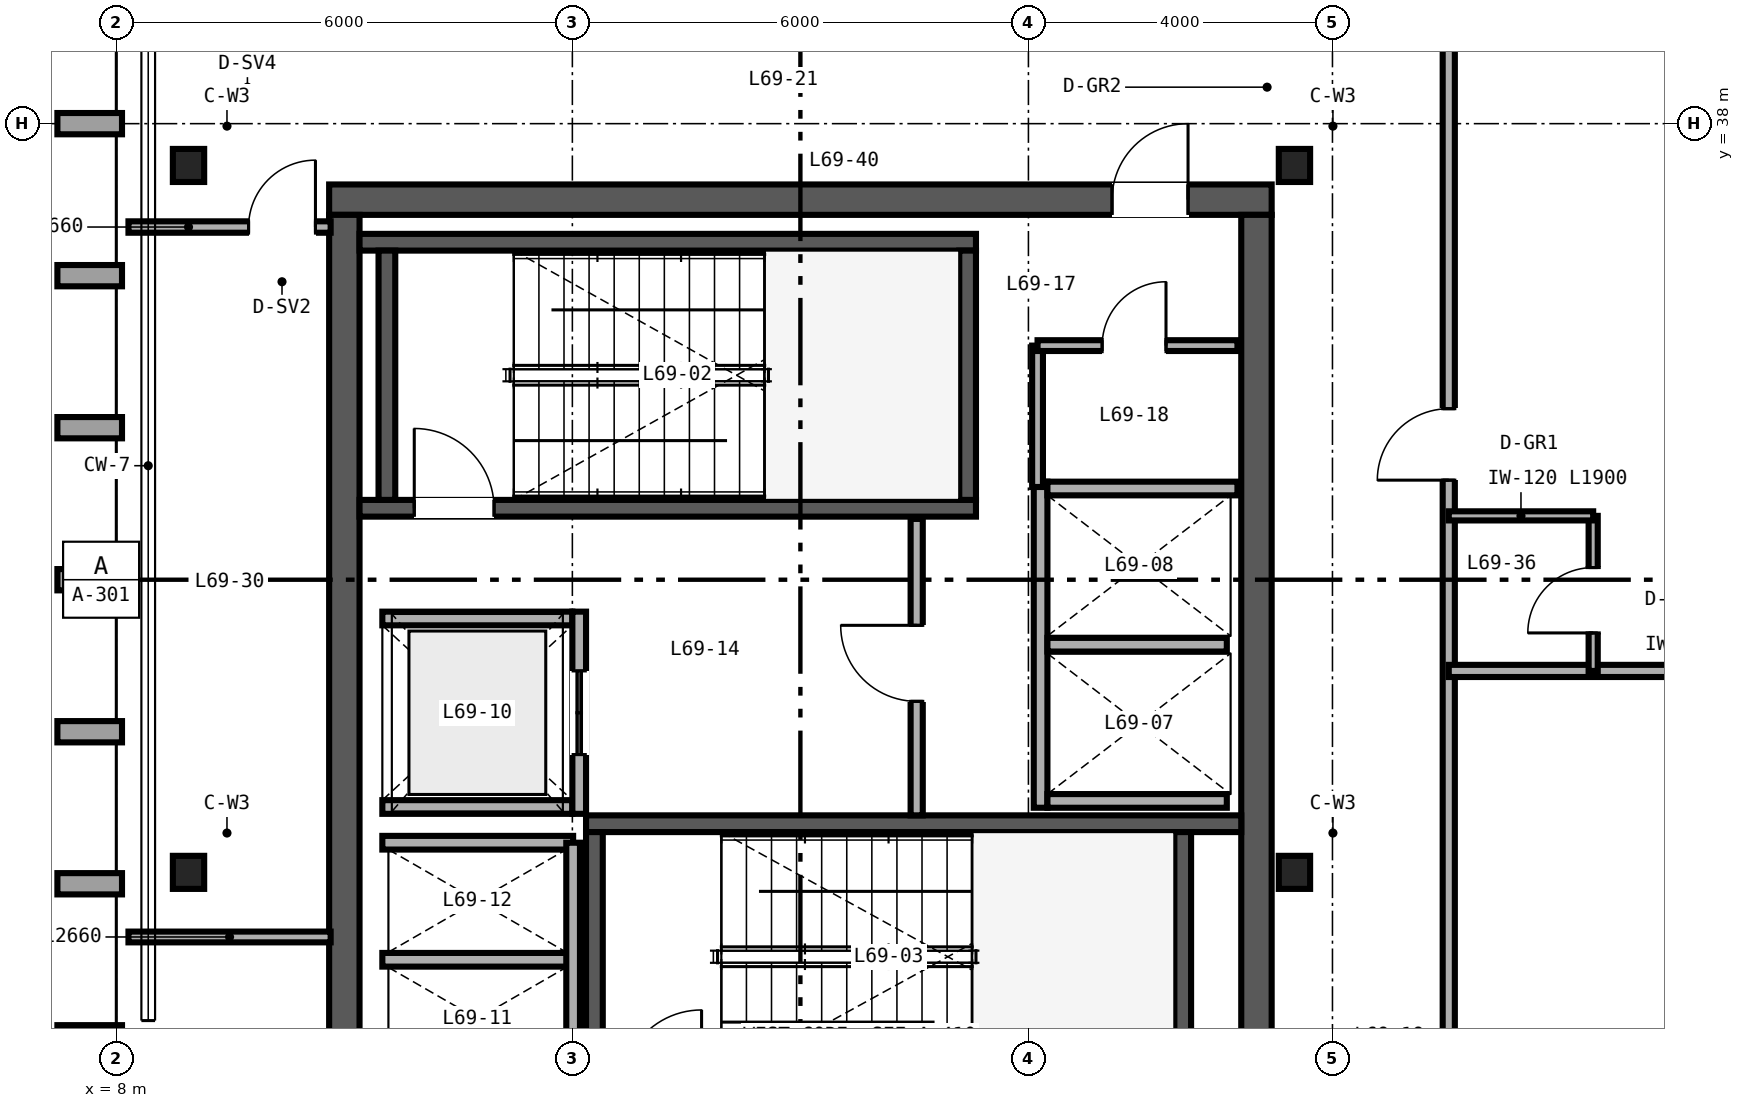
"""IFC4 building model, lengths in metres.
Left out: names, types, materials, properties, quantities, classifications, styles, units other than length and angle.
Written with IfcOpenShell. Run it as: python <this file> out.ifc"""

import sys

from ifc_helpers import new_model, si_unit, direction, frame, frame_2d, origin, origin_2d, place, context, subcontext, project, spatial, rectangle, i_section, extrude, source, transform, mapped, element, fill, save


model = new_model("IFC4")
c1 = context("Model", 3, precision=1e-05, world=origin(), true_north=direction((0.0, 1.0)))
c2 = subcontext(c1, "Body", "Model", "MODEL_VIEW")
j1 = project(units=[si_unit("LENGTHUNIT", "METRE"), si_unit("PLANEANGLEUNIT", "RADIAN")], contexts=[c1])
p1 = place(None, origin())
s1 = spatial("IfcSite", under=j1, at=p1, CompositionType="ELEMENT")
p2 = place(p1, origin())
s2 = spatial("IfcBuilding", under=s1, at=p2, CompositionType="ELEMENT")
p3 = place(p2, frame((0.0, 0.0, 272.4)))
s3 = spatial("IfcBuildingStorey", under=s2, at=p3, CompositionType="ELEMENT", Elevation=272.4)
p4 = place(p3, frame((10.8, 37.0, 0.0), z_axis=(0.0, 0.0, 1.0), x_axis=(1.0, 0.0, 0.0)))
e1 = element("IfcWall", 1, at=p4, inside=s3, PredefinedType="SHEAR", context=c2, shape_type="SweptSolid", body=[
    extrude(rectangle(XDim=12.4, YDim=0.4, at=frame_2d((6.2, 0.0))), origin(), (0.0, 0.0, 1.0), 3.38),
])
p5 = place(p4, frame((10.3, 0.0, 0.0)))
e2 = element("IfcOpeningElement", 2, at=p5, cuts=e1, PredefinedType="OPENING", context=c2, shape_type="SweptSolid", body=[
    extrude(rectangle(XDim=1.0, YDim=2.15, at=frame_2d((0.5, 1.075))), frame((0.0, 0.21, 0.0), z_axis=(0.0, -1.0, 0.0), x_axis=(1.0, 0.0, 0.0)), (0.0, 0.0, 1.0), 0.42),
])
for number, where, z_axis, x_axis in (
    (3, (11.0, 15.2, 0.0), (0.0, 0.0, 1.0), (0.0, 1.0, 0.0)),
    (4, (23.0, 15.2, 0.0), (0.0, 0.0, 1.0), (0.0, 1.0, 0.0)),
):
    element("IfcWall", number, at=place(p3, frame(where, z_axis=z_axis, x_axis=x_axis)), inside=s3, PredefinedType="SHEAR", context=c2, shape_type="SweptSolid", body=[
        extrude(rectangle(XDim=21.6, YDim=0.4, at=frame_2d((10.8, 0.0))), origin(), (0.0, 0.0, 1.0), 3.38),
    ])
p6 = place(p3, frame((11.2, 32.94, 0.0), z_axis=(0.0, 0.0, 1.0), x_axis=(1.0, 0.0, 0.0)))
e5 = element("IfcWall", 5, at=p6, inside=s3, PredefinedType="SHEAR", context=c2, shape_type="SweptSolid", body=[
    extrude(rectangle(XDim=8.11, YDim=0.22, at=frame_2d((4.055, 0.0))), origin(), (0.0, 0.0, 1.0), 3.4),
])
p7 = place(p6, frame((0.72, 0.0, 0.0)))
e6 = element("IfcOpeningElement", 6, at=p7, cuts=e5, PredefinedType="OPENING", context=c2, shape_type="SweptSolid", body=[
    extrude(rectangle(XDim=1.05, YDim=2.15, at=frame_2d((0.525, 1.075))), frame((0.0, 0.12, 0.0), z_axis=(0.0, -1.0, 0.0), x_axis=(1.0, 0.0, 0.0)), (0.0, 0.0, 1.0), 0.24),
])
p8 = place(p3, frame((11.2, 36.44, 0.0), z_axis=(0.0, 0.0, 1.0), x_axis=(1.0, 0.0, 0.0)))
e7 = element("IfcWall", 7, at=p8, inside=s3, PredefinedType="SHEAR", context=c2, shape_type="SweptSolid", body=[
    extrude(rectangle(XDim=8.11, YDim=0.22, at=frame_2d((4.055, 0.0))), origin(), (0.0, 0.0, 1.0), 3.4),
])
for number, where, z_axis, x_axis in (
    (8, (11.56, 33.05, 0.0), (0.0, 0.0, 1.0), (0.0, 1.0, 0.0)),
    (9, (19.2, 33.05, 0.0), (0.0, 0.0, 1.0), (0.0, 1.0, 0.0)),
):
    element("IfcWall", number, at=place(p3, frame(where, z_axis=z_axis, x_axis=x_axis)), inside=s3, PredefinedType="SHEAR", context=c2, shape_type="SweptSolid", body=[
        extrude(rectangle(XDim=3.28, YDim=0.22, at=frame_2d((1.64, 0.0))), origin(), (0.0, 0.0, 1.0), 3.4),
    ])
p9 = place(p3, frame((14.18, 28.79, 0.0), z_axis=(0.0, 0.0, 1.0), x_axis=(1.0, 0.0, 0.0)))
e10 = element("IfcWall", 10, at=p9, inside=s3, PredefinedType="SHEAR", context=c2, shape_type="SweptSolid", body=[
    extrude(rectangle(XDim=8.62, YDim=0.22, at=frame_2d((4.31, 0.0))), origin(), (0.0, 0.0, 1.0), 3.4),
])
for number, where, z_axis, x_axis in (
    (11, (14.29, 25.4, 0.0), (0.0, 0.0, 1.0), (0.0, 1.0, 0.0)),
    (12, (22.03, 25.4, 0.0), (0.0, 0.0, 1.0), (0.0, 1.0, 0.0)),
):
    element("IfcWall", number, at=place(p3, frame(where, z_axis=z_axis, x_axis=x_axis)), inside=s3, PredefinedType="SHEAR", context=c2, shape_type="SweptSolid", body=[
        extrude(rectangle(XDim=3.28, YDim=0.22, at=frame_2d((1.64, 0.0))), origin(), (0.0, 0.0, 1.0), 3.4),
    ])
m1 = source(origin(), c2, "Body", "SweptSolid", [
    extrude(i_section(OverallWidth=0.412, OverallDepth=0.435, WebThickness=0.036, FlangeThickness=0.057, FilletRadius=0.025, at=origin_2d()), origin(), (0.0, 0.0, 1.0), 3.38),
])
for number, where, z_axis, x_axis in (
    (13, (8.95, 28.15, 0.0), (0.0, 0.0, 1.0), (1.0, 0.0, 0.0)),
    (14, (23.5, 28.15, 0.0), (0.0, 0.0, 1.0), (1.0, 0.0, 0.0)),
    (15, (8.95, 37.45, 0.0), (0.0, 0.0, 1.0), (1.0, 0.0, 0.0)),
    (16, (23.5, 37.45, 0.0), (0.0, 0.0, 1.0), (1.0, 0.0, 0.0)),
):
    element("IfcColumn", number, at=place(p3, frame(where, z_axis=z_axis, x_axis=x_axis)), inside=s3, PredefinedType="COLUMN", context=c2, shape_type="MappedRepresentation", body=[
        mapped(m1, transform((0.0, 0.0, 0.0), scale=1.0)),
    ])
p10 = place(p3, frame((20.16, 29.0, 0.0), z_axis=(0.0, 0.0, 1.0), x_axis=(0.0, 1.0, 0.0)))
e17 = element("IfcWall", 17, at=p10, inside=s3, PredefinedType="SOLIDWALL", context=c2, shape_type="SweptSolid", body=[
    extrude(rectangle(XDim=4.29, YDim=0.18, at=frame_2d((2.145, 0.0))), origin(), (0.0, 0.0, 1.0), 3.38),
])
p11 = place(p3, frame((20.25, 29.09, 0.0), z_axis=(0.0, 0.0, 1.0), x_axis=(1.0, 0.0, 0.0)))
e18 = element("IfcWall", 18, at=p11, inside=s3, PredefinedType="SOLIDWALL", context=c2, shape_type="SweptSolid", body=[
    extrude(rectangle(XDim=2.36, YDim=0.18, at=frame_2d((1.18, 0.0))), origin(), (0.0, 0.0, 1.0), 3.38),
])
p12 = place(p3, frame((20.25, 33.2, 0.0), z_axis=(0.0, 0.0, 1.0), x_axis=(1.0, 0.0, 0.0)))
e19 = element("IfcWall", 19, at=p12, inside=s3, PredefinedType="SOLIDWALL", context=c2, shape_type="SweptSolid", body=[
    extrude(rectangle(XDim=2.5, YDim=0.18, at=frame_2d((1.25, 0.0))), origin(), (0.0, 0.0, 1.0), 3.38),
])
p13 = place(p3, frame((20.25, 31.145, 0.0), z_axis=(0.0, 0.0, 1.0), x_axis=(1.0, 0.0, 0.0)))
e20 = element("IfcWall", 20, at=p13, inside=s3, PredefinedType="SOLIDWALL", context=c2, shape_type="SweptSolid", body=[
    extrude(rectangle(XDim=2.36, YDim=0.18, at=frame_2d((1.18, 0.0))), origin(), (0.0, 0.0, 1.0), 3.38),
])
for number, where, z_axis, x_axis in (
    (21, (11.5, 29.01, 0.0), (0.0, 0.0, 1.0), (1.0, 0.0, 0.0)),
    (22, (11.5, 31.49, 0.0), (0.0, 0.0, 1.0), (1.0, 0.0, 0.0)),
):
    element("IfcWall", number, at=place(p3, frame(where, z_axis=z_axis, x_axis=x_axis)), inside=s3, PredefinedType="SOLIDWALL", context=c2, shape_type="SweptSolid", body=[
        extrude(rectangle(XDim=2.5, YDim=0.18, at=frame_2d((1.25, 0.0))), origin(), (0.0, 0.0, 1.0), 3.38),
    ])
p14 = place(p3, frame((14.09, 28.92, 0.0), z_axis=(0.0, 0.0, 1.0), x_axis=(0.0, 1.0, 0.0)))
e23 = element("IfcWall", 23, at=p14, inside=s3, PredefinedType="SOLIDWALL", context=c2, shape_type="SweptSolid", body=[
    extrude(rectangle(XDim=2.66, YDim=0.18, at=frame_2d((1.33, 0.0))), origin(), (0.0, 0.0, 1.0), 3.38),
])
p15 = place(p14, frame((0.78, 0.0, 0.0)))
e24 = element("IfcOpeningElement", 24, at=p15, cuts=e23, PredefinedType="OPENING", context=c2, shape_type="SweptSolid", body=[
    extrude(rectangle(XDim=1.1, YDim=2.2, at=frame_2d((0.55, 1.1))), frame((0.0, 0.1, 0.0), z_axis=(0.0, -1.0, 0.0), x_axis=(1.0, 0.0, 0.0)), (0.0, 0.0, 1.0), 0.2),
])
for number, where, z_axis, x_axis in (
    (25, (11.5, 27.0, 0.0), (0.0, 0.0, 1.0), (1.0, 0.0, 0.0)),
    (26, (11.5, 28.54, 0.0), (0.0, 0.0, 1.0), (1.0, 0.0, 0.0)),
):
    element("IfcWall", number, at=place(p3, frame(where, z_axis=z_axis, x_axis=x_axis)), inside=s3, PredefinedType="SOLIDWALL", context=c2, shape_type="SweptSolid", body=[
        extrude(rectangle(XDim=2.51, YDim=0.18, at=frame_2d((1.255, 0.0))), origin(), (0.0, 0.0, 1.0), 3.38),
    ])
p16 = place(p3, frame((14.01, 25.46, 0.0), z_axis=(0.0, 0.0, 1.0), x_axis=(0.0, 1.0, 0.0)))
e27 = element("IfcWall", 27, at=p16, inside=s3, PredefinedType="SOLIDWALL", context=c2, shape_type="SweptSolid", body=[
    extrude(rectangle(XDim=3.08, YDim=0.18, at=frame_2d((1.54, 0.0))), origin(), (0.0, 0.0, 1.0), 3.38),
])
p17 = place(p3, frame((18.53, 28.9, 0.0), z_axis=(0.0, 0.0, 1.0), x_axis=(0.0, 1.0, 0.0)))
e28 = element("IfcWall", 28, at=p17, inside=s3, PredefinedType="PARTITIONING", context=c2, shape_type="SweptSolid", body=[
    extrude(rectangle(XDim=3.9, YDim=0.16, at=frame_2d((1.95, 0.0))), origin(), (0.0, 0.0, 1.0), 3.38),
])
p18 = place(p17, frame((1.5, 0.0, 0.0)))
e29 = element("IfcOpeningElement", 29, at=p18, cuts=e28, PredefinedType="OPENING", context=c2, shape_type="SweptSolid", body=[
    extrude(rectangle(XDim=1.0, YDim=2.15, at=frame_2d((0.5, 1.075))), frame((0.0, 0.09, 0.0), z_axis=(0.0, -1.0, 0.0), x_axis=(1.0, 0.0, 0.0)), (0.0, 0.0, 1.0), 0.18),
])
p19 = place(p3, frame((20.12, 33.22, 0.0), z_axis=(0.0, 0.0, 1.0), x_axis=(0.0, 1.0, 0.0)))
e30 = element("IfcWall", 30, at=p19, inside=s3, PredefinedType="PARTITIONING", context=c2, shape_type="SweptSolid", body=[
    extrude(rectangle(XDim=1.86, YDim=0.142, at=frame_2d((0.93, 0.0))), origin(), (0.0, 0.0, 1.0), 3.38),
])
p20 = place(p3, frame((20.12, 35.08, 0.0), z_axis=(0.0, 0.0, 1.0), x_axis=(1.0, 0.0, 0.0)))
e31 = element("IfcWall", 31, at=p20, inside=s3, PredefinedType="PARTITIONING", context=c2, shape_type="SweptSolid", body=[
    extrude(rectangle(XDim=2.63, YDim=0.142, at=frame_2d((1.315, 0.0))), origin(), (0.0, 0.0, 1.0), 3.38),
])
p21 = place(p20, frame((0.85, 0.0, 0.0)))
e32 = element("IfcOpeningElement", 32, at=p21, cuts=e31, PredefinedType="OPENING", context=c2, shape_type="SweptSolid", body=[
    extrude(rectangle(XDim=0.84, YDim=2.1, at=frame_2d((0.42, 1.05))), frame((0.0, 0.081, 0.0), z_axis=(0.0, -1.0, 0.0), x_axis=(1.0, 0.0, 0.0)), (0.0, 0.0, 1.0), 0.162),
])
p22 = place(p3, frame((8.16, 36.64, 0.0), z_axis=(0.0, 0.0, 1.0), x_axis=(1.0, 0.0, 0.0)))
e33 = element("IfcWall", 33, at=p22, inside=s3, PredefinedType="PARTITIONING", context=c2, shape_type="SweptSolid", body=[
    extrude(rectangle(XDim=2.66, YDim=0.15, at=frame_2d((1.33, 0.0))), origin(), (0.0, 0.0, 1.0), 2.763),
])
p23 = place(p22, frame((1.58, 0.0, 0.0)))
e34 = element("IfcOpeningElement", 34, at=p23, cuts=e33, PredefinedType="OPENING", context=c2, shape_type="SweptSolid", body=[
    extrude(rectangle(XDim=0.88, YDim=2.15, at=frame_2d((0.44, 1.075))), frame((0.0, 0.085, 0.0), z_axis=(0.0, -1.0, 0.0), x_axis=(1.0, 0.0, 0.0)), (0.0, 0.0, 1.0), 0.17),
])
p24 = place(p3, frame((8.16, 27.3, 0.0), z_axis=(0.0, 0.0, 1.0), x_axis=(1.0, 0.0, 0.0)))
e35 = element("IfcWall", 35, at=p24, inside=s3, PredefinedType="PARTITIONING", context=c2, shape_type="SweptSolid", body=[
    extrude(rectangle(XDim=2.66, YDim=0.142, at=frame_2d((1.33, 0.0))), origin(), (0.0, 0.0, 1.0), 2.601),
])
p25 = place(p3, frame((25.53, 11.15, 0.0), z_axis=(0.0, 0.0, 1.0), x_axis=(0.0, 1.0, 0.0)))
e36 = element("IfcWall", 36, at=p25, inside=s3, PredefinedType="PARTITIONING", context=c2, shape_type="SweptSolid", body=[
    extrude(rectangle(XDim=29.7, YDim=0.16, at=frame_2d((14.85, 0.0))), origin(), (0.0, 0.0, 1.0), 2.524),
])
p26 = place(p25, frame((2.51, 0.0, 0.0)))
e37 = element("IfcOpeningElement", 37, at=p26, cuts=e36, PredefinedType="OPENING", context=c2, shape_type="SweptSolid", body=[
    extrude(rectangle(XDim=0.94, YDim=2.15, at=frame_2d((0.47, 1.075))), frame((0.0, 0.09, 0.0), z_axis=(0.0, -1.0, 0.0), x_axis=(1.0, 0.0, 0.0)), (0.0, 0.0, 1.0), 0.18),
])
p27 = place(p25, frame((12.56, 0.0, 0.0)))
e38 = element("IfcOpeningElement", 38, at=p27, cuts=e36, PredefinedType="OPENING", context=c2, shape_type="SweptSolid", body=[
    extrude(rectangle(XDim=0.94, YDim=2.15, at=frame_2d((0.47, 1.075))), frame((0.0, 0.09, 0.0), z_axis=(0.0, -1.0, 0.0), x_axis=(1.0, 0.0, 0.0)), (0.0, 0.0, 1.0), 0.18),
])
p28 = place(p25, frame((22.16, 0.0, 0.0)))
e39 = element("IfcOpeningElement", 39, at=p28, cuts=e36, PredefinedType="OPENING", context=c2, shape_type="SweptSolid", body=[
    extrude(rectangle(XDim=0.94, YDim=2.15, at=frame_2d((0.47, 1.075))), frame((0.0, 0.09, 0.0), z_axis=(0.0, -1.0, 0.0), x_axis=(1.0, 0.0, 0.0)), (0.0, 0.0, 1.0), 0.18),
])
p29 = place(p3, frame((25.53, 30.8, 0.0), z_axis=(0.0, 0.0, 1.0), x_axis=(1.0, 0.0, 0.0)))
e40 = element("IfcWall", 40, at=p29, inside=s3, PredefinedType="PARTITIONING", context=c2, shape_type="SweptSolid", body=[
    extrude(rectangle(XDim=7.15, YDim=0.16, at=frame_2d((3.575, 0.0))), origin(), (0.0, 0.0, 1.0), 2.763),
])
p30 = place(p3, frame((27.43, 30.8, 0.0), z_axis=(0.0, 0.0, 1.0), x_axis=(0.0, 1.0, 0.0)))
e41 = element("IfcWall", 41, at=p30, inside=s3, PredefinedType="PARTITIONING", context=c2, shape_type="SweptSolid", body=[
    extrude(rectangle(XDim=2.04, YDim=0.12, at=frame_2d((1.02, 0.0))), origin(), (0.0, 0.0, 1.0), 3.38),
])
p31 = place(p30, frame((0.5, 0.0, 0.0)))
e42 = element("IfcOpeningElement", 42, at=p31, cuts=e41, PredefinedType="OPENING", context=c2, shape_type="SweptSolid", body=[
    extrude(rectangle(XDim=0.86, YDim=2.1, at=frame_2d((0.43, 1.05))), frame((0.0, 0.07, 0.0), z_axis=(0.0, -1.0, 0.0), x_axis=(1.0, 0.0, 0.0)), (0.0, 0.0, 1.0), 0.14),
])
p32 = place(p3, frame((25.53, 32.84, 0.0), z_axis=(0.0, 0.0, 1.0), x_axis=(1.0, 0.0, 0.0)))
e43 = element("IfcWall", 43, at=p32, inside=s3, PredefinedType="PARTITIONING", context=c2, shape_type="SweptSolid", body=[
    extrude(rectangle(XDim=1.9, YDim=0.12, at=frame_2d((0.95, 0.0))), origin(), (0.0, 0.0, 1.0), 3.38),
])
m2 = source(origin(), c2, "Body", "SweptSolid", [
    extrude(rectangle(XDim=1.05, YDim=2.15, at=frame_2d((0.525, 1.075))), frame((0.0, 0.025, 0.0), z_axis=(0.0, -1.0, 0.0), x_axis=(1.0, 0.0, 0.0)), (0.0, 0.0, 1.0), 0.05),
])
p33 = place(p7, origin())
e44 = element("IfcDoor", 44, at=p33, inside=s3, OperationType="SINGLE_SWING_LEFT", PredefinedType="DOOR", context=c2, shape_type="MappedRepresentation", body=[
    mapped(m2, transform((0.0, 0.0, 0.0), scale=1.0)),
])
fill(e6, e44)
m3 = source(origin(), c2, "Body", "SweptSolid", [
    extrude(rectangle(XDim=1.1, YDim=2.2, at=frame_2d((0.55, 1.1))), frame((0.0, 0.025, 0.0), z_axis=(0.0, -1.0, 0.0), x_axis=(1.0, 0.0, 0.0)), (0.0, 0.0, 1.0), 0.05),
])
p34 = place(p15, origin())
e45 = element("IfcDoor", 45, at=p34, inside=s3, OperationType="DOUBLE_DOOR_SLIDING", PredefinedType="DOOR", context=c2, shape_type="MappedRepresentation", body=[
    mapped(m3, transform((0.0, 0.0, 0.0), scale=1.0)),
])
fill(e24, e45)
m4 = source(origin(), c2, "Body", "SweptSolid", [
    extrude(rectangle(XDim=1.0, YDim=2.15, at=frame_2d((0.5, 1.075))), frame((0.0, 0.025, 0.0), z_axis=(0.0, -1.0, 0.0), x_axis=(1.0, 0.0, 0.0)), (0.0, 0.0, 1.0), 0.05),
])
p35 = place(p18, origin())
e46 = element("IfcDoor", 46, at=p35, inside=s3, OperationType="SINGLE_SWING_RIGHT", PredefinedType="DOOR", context=c2, shape_type="MappedRepresentation", body=[
    mapped(m4, transform((0.0, 0.0, 0.0), scale=1.0)),
])
fill(e29, e46)
m5 = source(origin(), c2, "Body", "SweptSolid", [
    extrude(rectangle(XDim=0.84, YDim=2.1, at=frame_2d((0.42, 1.05))), frame((0.0, 0.025, 0.0), z_axis=(0.0, -1.0, 0.0), x_axis=(1.0, 0.0, 0.0)), (0.0, 0.0, 1.0), 0.05),
])
p36 = place(p21, origin())
e47 = element("IfcDoor", 47, at=p36, inside=s3, OperationType="SINGLE_SWING_RIGHT", PredefinedType="DOOR", context=c2, shape_type="MappedRepresentation", body=[
    mapped(m5, transform((0.0, 0.0, 0.0), scale=1.0)),
])
fill(e32, e47)
p37 = place(p5, origin())
e48 = element("IfcDoor", 48, at=p37, inside=s3, OperationType="SINGLE_SWING_RIGHT", PredefinedType="DOOR", context=c2, shape_type="MappedRepresentation", body=[
    mapped(m4, transform((0.0, 0.0, 0.0), scale=1.0)),
])
fill(e2, e48)
m6 = source(origin(), c2, "Body", "SweptSolid", [
    extrude(rectangle(XDim=0.88, YDim=2.15, at=frame_2d((0.44, 1.075))), frame((0.0, 0.025, 0.0), z_axis=(0.0, -1.0, 0.0), x_axis=(1.0, 0.0, 0.0)), (0.0, 0.0, 1.0), 0.05),
])
p38 = place(p23, origin())
e49 = element("IfcDoor", 49, at=p38, inside=s3, OperationType="SINGLE_SWING_RIGHT", PredefinedType="DOOR", context=c2, shape_type="MappedRepresentation", body=[
    mapped(m6, transform((0.0, 0.0, 0.0), scale=1.0)),
])
fill(e34, e49)
m7 = source(origin(), c2, "Body", "SweptSolid", [
    extrude(rectangle(XDim=0.86, YDim=2.1, at=frame_2d((0.43, 1.05))), frame((0.0, 0.025, 0.0), z_axis=(0.0, -1.0, 0.0), x_axis=(1.0, 0.0, 0.0)), (0.0, 0.0, 1.0), 0.05),
])
p39 = place(p31, origin())
e50 = element("IfcDoor", 50, at=p39, inside=s3, OperationType="SINGLE_SWING_LEFT", PredefinedType="DOOR", context=c2, shape_type="MappedRepresentation", body=[
    mapped(m7, transform((0.0, 0.0, 0.0), scale=1.0)),
])
fill(e42, e50)
m8 = source(origin(), c2, "Body", "SweptSolid", [
    extrude(rectangle(XDim=0.94, YDim=2.15, at=frame_2d((0.47, 1.075))), frame((0.0, 0.025, 0.0), z_axis=(0.0, -1.0, 0.0), x_axis=(1.0, 0.0, 0.0)), (0.0, 0.0, 1.0), 0.05),
])
p40 = place(p28, origin())
e51 = element("IfcDoor", 51, at=p40, inside=s3, OperationType="SINGLE_SWING_LEFT", PredefinedType="DOOR", context=c2, shape_type="MappedRepresentation", body=[
    mapped(m8, transform((0.0, 0.0, 0.0), scale=1.0)),
])
fill(e39, e51)
save(model, sys.argv[1])
